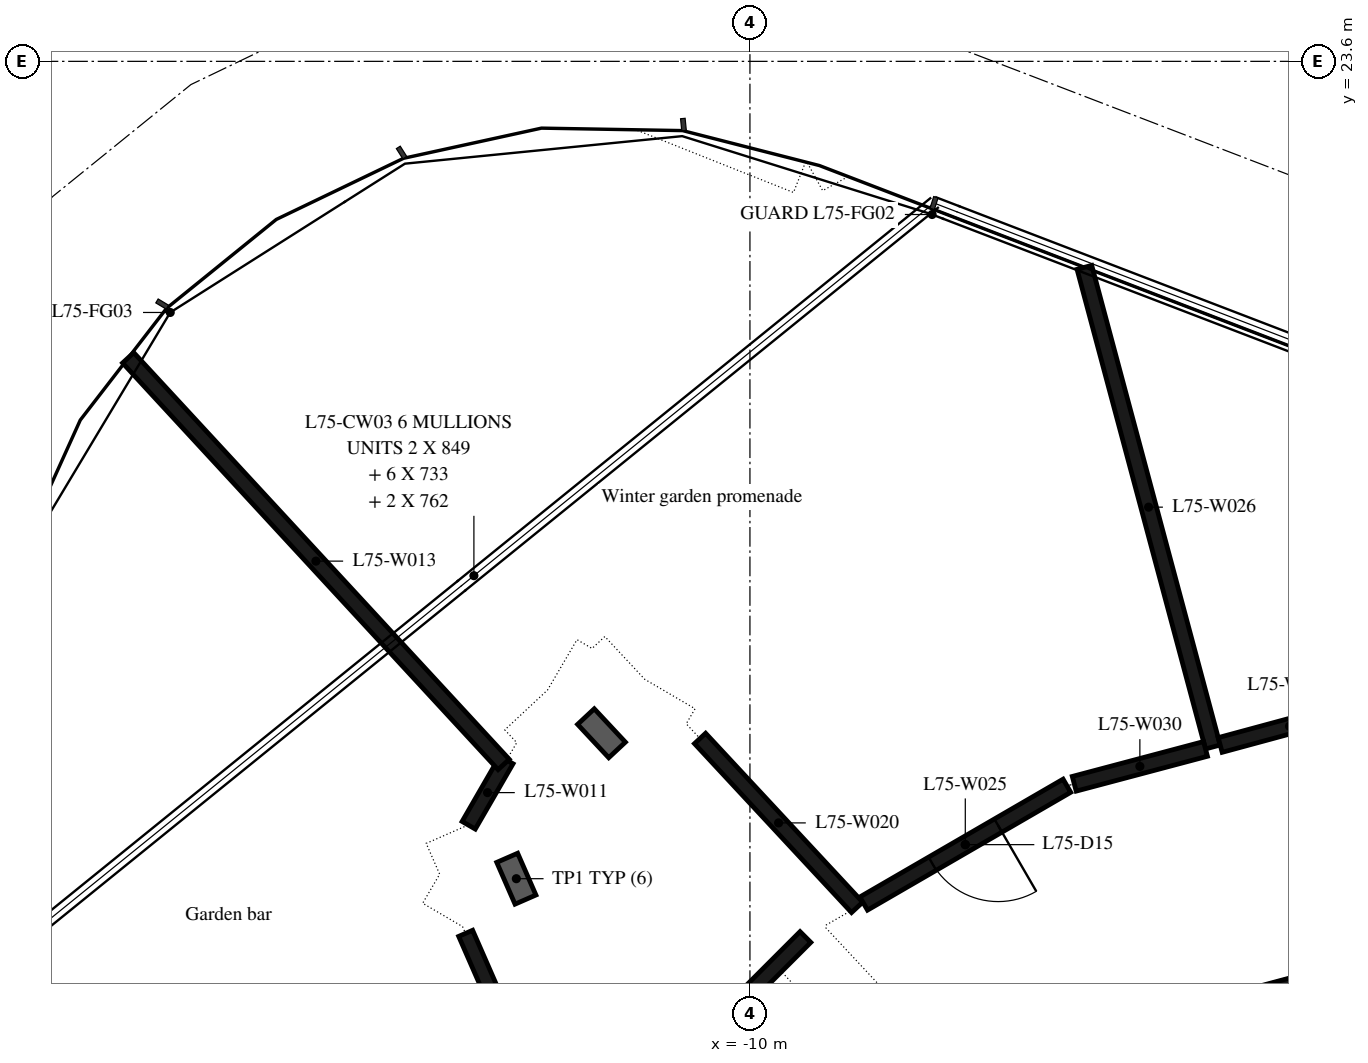
"""IFC4 building model, lengths in metres.
Left out: names, types, materials, properties, quantities, classifications, styles, units other than length and angle.
Written with IfcOpenShell. Run it as: python <this file> out.ifc"""

import sys

from ifc_helpers import new_model, si_unit, direction, frame, frame_2d, origin, place, context, subcontext, project, spatial, rectangle, extrude, element, fill, save


model = new_model("IFC4")
c1 = context("Model", 3, precision=1e-05, world=origin(), true_north=direction((0.0, 1.0)))
c2 = subcontext(c1, "Body", "Model", "MODEL_VIEW")
j1 = project(units=[si_unit("LENGTHUNIT", "METRE"), si_unit("PLANEANGLEUNIT", "RADIAN")], contexts=[c1])
p1 = place(None, origin())
s1 = spatial("IfcSite", under=j1, at=p1, CompositionType="ELEMENT")
p2 = place(p1, origin())
s2 = spatial("IfcBuilding", under=s1, at=p2, CompositionType="ELEMENT")
p3 = place(p2, frame((0.0, 0.0, 291.4)))
s3 = spatial("IfcBuildingStorey", under=s2, at=p3, CompositionType="ELEMENT", Elevation=291.4)
p4 = place(p3, frame((-1.55, 11.643, 0.0), z_axis=(0.0, 0.0, 1.0), x_axis=(-0.965948410781, -0.258734743916, 0.0)))
e1 = element("IfcWall", 1, at=p4, inside=s3, PredefinedType="SHEAR", context=c2, shape_type="SweptSolid", body=[
    extrude(rectangle(XDim=3.033, YDim=0.5, at=frame_2d((1.516, 0.0))), origin(), (0.0, 0.0, 1.0), 6.35),
])
p5 = place(p3, frame((-13.7, 13.55, 0.0), z_axis=(0.0, 0.0, 1.0), x_axis=(0.500425153996, 0.865779801825, 0.0)))
e2 = element("IfcWall", 2, at=p5, inside=s3, PredefinedType="PARTITIONING", context=c2, shape_type="SweptSolid", body=[
    extrude(rectangle(XDim=0.992, YDim=0.2, at=frame_2d((0.496, 0.0))), origin(), (0.0, 0.0, 1.0), 6.35),
])
p6 = place(p3, frame((-13.24, 14.35, 0.0), z_axis=(0.0, 0.0, 1.0), x_axis=(-0.678399850878, 0.734692889804, 0.0)))
e3 = element("IfcWall", 3, at=p6, inside=s3, PredefinedType="PARTITIONING", context=c2, shape_type="SweptSolid", body=[
    extrude(rectangle(XDim=7.282, YDim=0.2, at=frame_2d((3.641, 0.0))), origin(), (0.0, 0.0, 1.0), 6.35),
])
p7 = place(p3, frame((-12.31, 8.86, 0.0), z_axis=(0.0, 0.0, 1.0), x_axis=(-0.400829604246, 0.916152622853, 0.0)))
e4 = element("IfcWall", 4, at=p7, inside=s3, PredefinedType="PARTITIONING", context=c2, shape_type="SweptSolid", body=[
    extrude(rectangle(XDim=3.567, YDim=0.2, at=frame_2d((1.784, 0.0))), origin(), (0.0, 0.0, 1.0), 6.35),
])
p8 = place(p3, frame((-12.009, 9.341, 0.0), z_axis=(0.0, 0.0, 1.0), x_axis=(0.707106781187, 0.707106781187, 0.0)))
e5 = element("IfcWall", 5, at=p8, inside=s3, PredefinedType="PARTITIONING", context=c2, shape_type="SweptSolid", body=[
    extrude(rectangle(XDim=3.874, YDim=0.2, at=frame_2d((1.937, 0.0))), origin(), (0.0, 0.0, 1.0), 6.35),
])
p9 = place(p3, frame((-8.59, 12.47, 0.0), z_axis=(0.0, 0.0, 1.0), x_axis=(-0.680892267187, 0.73238358835, 0.0)))
e6 = element("IfcWall", 6, at=p9, inside=s3, PredefinedType="PARTITIONING", context=c2, shape_type="SweptSolid", body=[
    extrude(rectangle(XDim=3.034, YDim=0.2, at=frame_2d((1.517, 0.0))), origin(), (0.0, 0.0, 1.0), 6.35),
])
p10 = place(p3, frame((-5.83, 14.07, 0.0), z_axis=(0.0, 0.0, 1.0), x_axis=(-0.865134039498, -0.501540719884, 0.0)))
e7 = element("IfcWall", 7, at=p10, inside=s3, PredefinedType="PARTITIONING", context=c2, shape_type="SweptSolid", body=[
    extrude(rectangle(XDim=3.09, YDim=0.2, at=frame_2d((1.545, 0.0))), origin(), (0.0, 0.0, 1.0), 6.35),
])
p11 = place(p10, frame((1.045, 0.0, 0.0)))
e8 = element("IfcOpeningElement", 8, at=p11, cuts=e7, PredefinedType="OPENING", context=c2, shape_type="SweptSolid", body=[
    extrude(rectangle(XDim=1.0, YDim=2.1, at=frame_2d((0.5, 1.05))), frame((0.0, 0.11, 0.0), z_axis=(0.0, -1.0, 0.0), x_axis=(1.0, 0.0, 0.0)), (0.0, 0.0, 1.0), 0.22),
])
p12 = place(p3, frame((-5.6, 20.89, 0.0), z_axis=(0.0, 0.0, 1.0), x_axis=(0.25874418063, -0.965945883055, 0.0)))
e9 = element("IfcWall", 9, at=p12, inside=s3, PredefinedType="PARTITIONING", context=c2, shape_type="SweptSolid", body=[
    extrude(rectangle(XDim=6.532, YDim=0.2, at=frame_2d((3.266, 0.0))), origin(), (0.0, 0.0, 1.0), 6.35),
])
p13 = place(p3, frame((-4.007, 14.554, 0.0), z_axis=(0.0, 0.0, 1.0), x_axis=(-0.966477180281, -0.256752526756, 0.0)))
e10 = element("IfcWall", 10, at=p13, inside=s3, PredefinedType="PARTITIONING", context=c2, shape_type="SweptSolid", body=[
    extrude(rectangle(XDim=1.787, YDim=0.2, at=frame_2d((0.893, 0.0))), origin(), (0.0, 0.0, 1.0), 6.35),
])
p14 = place(p3, frame((-1.99, 15.1, 0.0), z_axis=(0.0, 0.0, 1.0), x_axis=(-0.965221616417, -0.261433033875, 0.0)))
e11 = element("IfcWall", 11, at=p14, inside=s3, PredefinedType="PARTITIONING", context=c2, shape_type="SweptSolid", body=[
    extrude(rectangle(XDim=1.889, YDim=0.2, at=frame_2d((0.945, 0.0))), origin(), (0.0, 0.0, 1.0), 6.35),
])
p15 = place(p11, origin())
e12 = element("IfcDoor", 12, at=p15, inside=s3, OperationType="SINGLE_SWING_LEFT", PredefinedType="DOOR", context=c2, shape_type="SweptSolid", body=[
    extrude(rectangle(XDim=1.0, YDim=2.1, at=frame_2d((0.5, 1.05))), frame((0.0, 0.025, 0.0), z_axis=(0.0, -1.0, 0.0), x_axis=(1.0, 0.0, 0.0)), (0.0, 0.0, 1.0), 0.05),
])
fill(e8, e12)
save(model, sys.argv[1])
